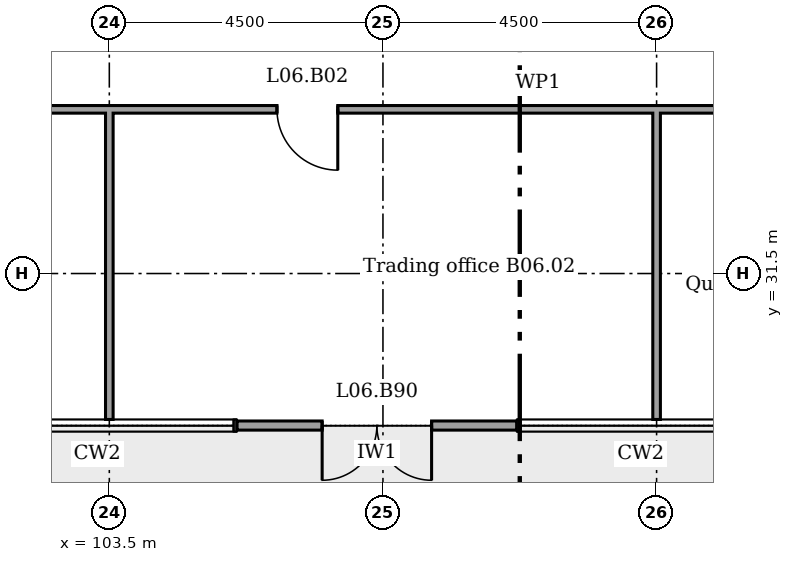
"""IFC4 building model, lengths in metres.
Left out: names, types, materials, properties, quantities, classifications, styles, units other than length and angle.
Written with IfcOpenShell. Run it as: python <this file> out.ifc"""

import sys

from ifc_helpers import new_model, si_unit, direction, frame, frame_2d, origin, place, context, subcontext, project, spatial, rectangle, extrude, element, fill, save


model = new_model("IFC4")
c1 = context("Model", 3, precision=1e-05, world=origin(), true_north=direction((0.0, 1.0)))
c2 = subcontext(c1, "Body", "Model", "MODEL_VIEW")
j1 = project(units=[si_unit("LENGTHUNIT", "METRE"), si_unit("PLANEANGLEUNIT", "RADIAN")], contexts=[c1])
p1 = place(None, origin())
s1 = spatial("IfcSite", under=j1, at=p1, CompositionType="ELEMENT")
p2 = place(p1, origin())
s2 = spatial("IfcBuilding", under=s1, at=p2, CompositionType="ELEMENT")
p3 = place(p2, frame((0.0, 0.0, 29.8)))
s3 = spatial("IfcBuildingStorey", under=s2, at=p3, CompositionType="ELEMENT", Elevation=29.8)
p4 = place(p3, frame((105.6, 29.0, 0.0)))
e1 = element("IfcWall", 1, at=p4, inside=s3, PredefinedType="SOLIDWALL", context=c2, shape_type="SweptSolid", body=[
    extrude(rectangle(XDim=4.6, YDim=0.15, at=frame_2d((2.3, 0.0))), origin(), (0.0, 0.0, 1.0), 4.225),
])
p5 = place(p4, frame((1.4, 0.0, 0.0)))
e2 = element("IfcOpeningElement", 2, at=p5, cuts=e1, PredefinedType="OPENING", context=c2, shape_type="SweptSolid", body=[
    extrude(rectangle(XDim=1.8, YDim=2.4, at=frame_2d((0.9, 1.2))), frame((0.0, 0.085, 0.0), z_axis=(0.0, -1.0, 0.0), x_axis=(1.0, 0.0, 0.0)), (0.0, 0.0, 1.0), 0.17),
])
p6 = place(p3, frame((101.038, 34.2, 0.0)))
e3 = element("IfcWall", 3, at=p6, inside=s3, PredefinedType="PARTITIONING", context=c2, shape_type="SweptSolid", body=[
    extrude(rectangle(XDim=19.025, YDim=0.125, at=frame_2d((9.512, 0.0))), origin(), (0.0, 0.0, 1.0), 4.225),
])
p7 = place(p6, frame((5.219, 0.0, 0.0)))
e4 = element("IfcOpeningElement", 4, at=p7, cuts=e3, PredefinedType="OPENING", context=c2, shape_type="SweptSolid", body=[
    extrude(rectangle(XDim=1.0, YDim=2.1, at=frame_2d((0.5, 1.05))), frame((0.0, 0.073, 0.0), z_axis=(0.0, -1.0, 0.0), x_axis=(1.0, 0.0, 0.0)), (0.0, 0.0, 1.0), 0.145),
])
p8 = place(p6, frame((13.667, 0.0, 0.0)))
e5 = element("IfcOpeningElement", 5, at=p8, cuts=e3, PredefinedType="OPENING", context=c2, shape_type="SweptSolid", body=[
    extrude(rectangle(XDim=1.0, YDim=2.1, at=frame_2d((0.5, 1.05))), frame((0.0, 0.073, 0.0), z_axis=(0.0, -1.0, 0.0), x_axis=(1.0, 0.0, 0.0)), (0.0, 0.0, 1.0), 0.145),
])
for number, where, z_axis, x_axis in (
    (6, (103.5, 29.1, 0.0), (0.0, 0.0, 1.0), (0.0, 1.0, 0.0)),
    (7, (112.5, 29.1, 0.0), (0.0, 0.0, 1.0), (0.0, 1.0, 0.0)),
):
    element("IfcWall", number, at=place(p3, frame(where, z_axis=z_axis, x_axis=x_axis)), inside=s3, PredefinedType="PARTITIONING", context=c2, shape_type="SweptSolid", body=[
        extrude(rectangle(XDim=5.1, YDim=0.125, at=frame_2d((2.55, 0.0))), origin(), (0.0, 0.0, 1.0), 3.613),
    ])
p9 = place(p5, frame((1.8, 0.0, 0.0), x_axis=(-1.0, 0.0, 0.0)))
e8 = element("IfcDoor", 8, at=p9, inside=s3, OperationType="DOUBLE_DOOR_DOUBLE_SWING", PredefinedType="NOTDEFINED", context=c2, shape_type="SweptSolid", body=[
    extrude(rectangle(XDim=1.8, YDim=2.4, at=frame_2d((0.9, 1.2))), frame((0.0, 0.025, 0.0), z_axis=(0.0, -1.0, 0.0), x_axis=(1.0, 0.0, 0.0)), (0.0, 0.0, 1.0), 0.05),
])
fill(e2, e8)
p10 = place(p7, frame((1.0, 0.0, 0.0), x_axis=(-1.0, 0.0, 0.0)))
e9 = element("IfcDoor", 9, at=p10, inside=s3, OperationType="SINGLE_SWING_RIGHT", PredefinedType="DOOR", context=c2, shape_type="SweptSolid", body=[
    extrude(rectangle(XDim=1.0, YDim=2.1, at=frame_2d((0.5, 1.05))), frame((0.0, 0.025, 0.0), z_axis=(0.0, -1.0, 0.0), x_axis=(1.0, 0.0, 0.0)), (0.0, 0.0, 1.0), 0.05),
])
fill(e4, e9)
save(model, sys.argv[1])
